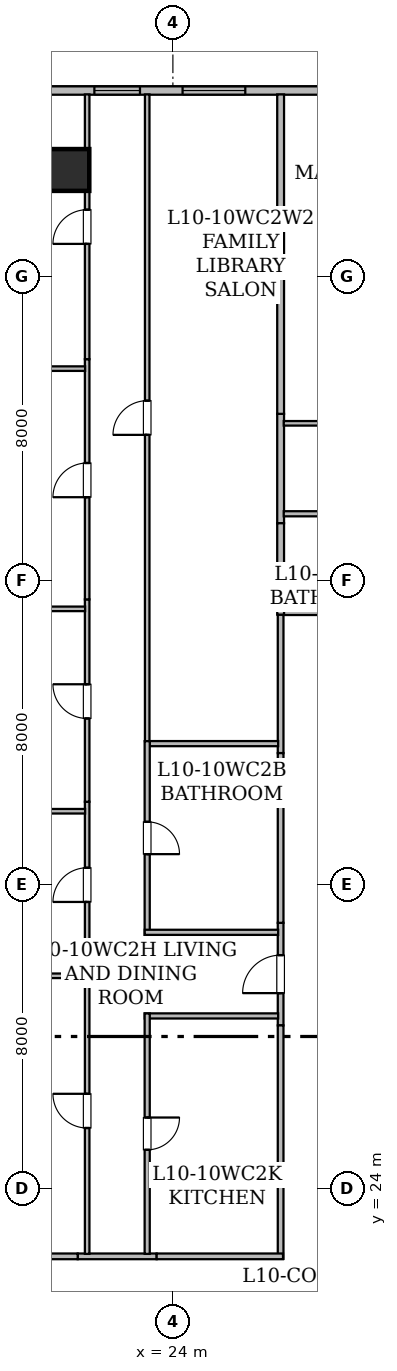
"""IFC4 building model, lengths in metres.
Left out: names, types, materials, properties, quantities, classifications, styles, units other than length and angle.
Written with IfcOpenShell. Run it as: python <this file> out.ifc"""

import sys

from ifc_helpers import new_model, si_unit, direction, frame, frame_2d, origin, origin_2d, place, context, subcontext, project, spatial, rectangle, hollow_rectangle, extrude, element, fill, save


model = new_model("IFC4")
c1 = context("Model", 3, precision=1e-05, world=origin(), true_north=direction((0.0, 1.0)))
c2 = subcontext(c1, "Body", "Model", "MODEL_VIEW")
j1 = project(units=[si_unit("LENGTHUNIT", "METRE"), si_unit("PLANEANGLEUNIT", "RADIAN")], contexts=[c1])
p1 = place(None, origin())
s1 = spatial("IfcSite", under=j1, at=p1, CompositionType="ELEMENT")
p2 = place(p1, origin())
s2 = spatial("IfcBuilding", under=s1, at=p2, CompositionType="ELEMENT")
p3 = place(p2, frame((0.0, 0.0, 44.25)))
s3 = spatial("IfcBuildingStorey", under=s2, at=p3, CompositionType="ELEMENT", Elevation=44.25)
p4 = place(p3, frame((21.25, 50.8, 0.0), z_axis=(0.0, 0.0, 1.0), x_axis=(1.0, 0.0, 0.0)))
e1 = element("IfcColumn", 1, at=p4, inside=s3, PredefinedType="COLUMN", context=c2, shape_type="SweptSolid", body=[
    extrude(hollow_rectangle(XDim=1.1, YDim=1.1, WallThickness=0.055, at=origin_2d()), origin(), (0.0, 0.0, 1.0), 3.65),
])
p5 = place(p3, frame((8.315, 52.89, 0.0), z_axis=(0.0, 0.0, 1.0), x_axis=(1.0, 0.0, 0.0)))
e2 = element("IfcWall", 2, at=p5, inside=s3, PredefinedType="STANDARD", context=c2, shape_type="SweptSolid", body=[
    extrude(rectangle(XDim=37.439, YDim=0.22, at=frame_2d((18.719, 0.0))), origin(), (0.0, 0.0, 1.0), 3.43),
])
p6 = place(p5, frame((3.164, 0.0, 0.85)))
e3 = element("IfcOpeningElement", 3, at=p6, cuts=e2, PredefinedType="OPENING", context=c2, shape_type="SweptSolid", body=[
    extrude(rectangle(XDim=1.65, YDim=1.55, at=frame_2d((0.825, 0.775))), frame((0.0, 0.12, 0.0), z_axis=(0.0, -1.0, 0.0), x_axis=(1.0, 0.0, 0.0)), (0.0, 0.0, 1.0), 0.24),
])
p7 = place(p5, frame((15.94, 0.0, 0.85)))
e4 = element("IfcOpeningElement", 4, at=p7, cuts=e2, PredefinedType="OPENING", context=c2, shape_type="SweptSolid", body=[
    extrude(rectangle(XDim=1.65, YDim=1.55, at=frame_2d((0.825, 0.775))), frame((0.0, 0.12, 0.0), z_axis=(0.0, -1.0, 0.0), x_axis=(1.0, 0.0, 0.0)), (0.0, 0.0, 1.0), 0.24),
])
p8 = place(p5, frame((13.619, 0.0, 0.8)))
e5 = element("IfcOpeningElement", 5, at=p8, cuts=e2, PredefinedType="OPENING", context=c2, shape_type="SweptSolid", body=[
    extrude(rectangle(XDim=1.2, YDim=1.5, at=frame_2d((0.6, 0.75))), frame((0.0, 0.12, 0.0), z_axis=(0.0, -1.0, 0.0), x_axis=(1.0, 0.0, 0.0)), (0.0, 0.0, 1.0), 0.24),
])
p9 = place(p5, frame((8.999, 0.0, 0.85)))
e6 = element("IfcOpeningElement", 6, at=p9, cuts=e2, PredefinedType="OPENING", context=c2, shape_type="SweptSolid", body=[
    extrude(rectangle(XDim=1.65, YDim=1.55, at=frame_2d((0.825, 0.775))), frame((0.0, 0.12, 0.0), z_axis=(0.0, -1.0, 0.0), x_axis=(1.0, 0.0, 0.0)), (0.0, 0.0, 1.0), 0.24),
])
p10 = place(p5, frame((25.185, 0.0, 0.8)))
e7 = element("IfcOpeningElement", 7, at=p10, cuts=e2, PredefinedType="OPENING", context=c2, shape_type="SweptSolid", body=[
    extrude(rectangle(XDim=1.2, YDim=1.5, at=frame_2d((0.6, 0.75))), frame((0.0, 0.12, 0.0), z_axis=(0.0, -1.0, 0.0), x_axis=(1.0, 0.0, 0.0)), (0.0, 0.0, 1.0), 0.24),
])
p11 = place(p5, frame((20.935, 0.0, 0.85)))
e8 = element("IfcOpeningElement", 8, at=p11, cuts=e2, PredefinedType="OPENING", context=c2, shape_type="SweptSolid", body=[
    extrude(rectangle(XDim=1.65, YDim=1.55, at=frame_2d((0.825, 0.775))), frame((0.0, 0.12, 0.0), z_axis=(0.0, -1.0, 0.0), x_axis=(1.0, 0.0, 0.0)), (0.0, 0.0, 1.0), 0.24),
])
p12 = place(p5, frame((28.985, 0.0, 0.85)))
e9 = element("IfcOpeningElement", 9, at=p12, cuts=e2, PredefinedType="OPENING", context=c2, shape_type="SweptSolid", body=[
    extrude(rectangle(XDim=1.65, YDim=1.55, at=frame_2d((0.825, 0.775))), frame((0.0, 0.12, 0.0), z_axis=(0.0, -1.0, 0.0), x_axis=(1.0, 0.0, 0.0)), (0.0, 0.0, 1.0), 0.24),
])
p13 = place(p5, frame((33.98, 0.0, 0.85)))
e10 = element("IfcOpeningElement", 10, at=p13, cuts=e2, PredefinedType="OPENING", context=c2, shape_type="SweptSolid", body=[
    extrude(rectangle(XDim=1.65, YDim=1.55, at=frame_2d((0.825, 0.775))), frame((0.0, 0.12, 0.0), z_axis=(0.0, -1.0, 0.0), x_axis=(1.0, 0.0, 0.0)), (0.0, 0.0, 1.0), 0.24),
])
p14 = place(p3, frame((26.835, 35.457, 0.0), z_axis=(0.0, 0.0, 1.0), x_axis=(0.0, 1.0, 0.0)))
e11 = element("IfcWall", 11, at=p14, inside=s3, PredefinedType="STANDARD", context=c2, shape_type="SweptSolid", body=[
    extrude(rectangle(XDim=3.643, YDim=0.15, at=frame_2d((1.822, 0.0))), origin(), (0.0, 0.0, 1.0), 2.647),
])
p15 = place(p3, frame((26.835, 28.292, 0.0), z_axis=(0.0, 0.0, 1.0), x_axis=(0.0, 1.0, 0.0)))
e12 = element("IfcWall", 12, at=p15, inside=s3, PredefinedType="STANDARD", context=c2, shape_type="SweptSolid", body=[
    extrude(rectangle(XDim=2.698, YDim=0.15, at=frame_2d((1.349, 0.0))), origin(), (0.0, 0.0, 1.0), 3.43),
])
p16 = place(p15, frame((0.849, 0.0, 0.0)))
e13 = element("IfcOpeningElement", 13, at=p16, cuts=e12, PredefinedType="OPENING", context=c2, shape_type="SweptSolid", body=[
    extrude(rectangle(XDim=1.0, YDim=2.15, at=frame_2d((0.5, 1.075))), frame((0.0, 0.085, 0.0), z_axis=(0.0, -1.0, 0.0), x_axis=(1.0, 0.0, 0.0)), (0.0, 0.0, 1.0), 0.17),
])
p17 = place(p3, frame((21.495, 22.215, 0.0), z_axis=(0.0, 0.0, 1.0), x_axis=(1.0, 0.0, 0.0)))
e14 = element("IfcWall", 14, at=p17, inside=s3, PredefinedType="STANDARD", context=c2, shape_type="SweptSolid", body=[
    extrude(rectangle(XDim=2.078, YDim=0.15, at=frame_2d((1.039, 0.0))), origin(), (0.0, 0.0, 1.0), 3.43),
])
p18 = place(p3, frame((26.835, 30.99, 0.0), z_axis=(0.0, 0.0, 1.0), x_axis=(0.0, 1.0, 0.0)))
e15 = element("IfcWall", 15, at=p18, inside=s3, PredefinedType="STANDARD", context=c2, shape_type="SweptSolid", body=[
    extrude(rectangle(XDim=4.467, YDim=0.15, at=frame_2d((2.233, 0.0))), origin(), (0.0, 0.0, 1.0), 3.43),
])
p19 = place(p3, frame((26.835, 22.15, 0.0), z_axis=(0.0, 0.0, 1.0), x_axis=(0.0, 1.0, 0.0)))
e16 = element("IfcWall", 16, at=p19, inside=s3, PredefinedType="STANDARD", context=c2, shape_type="SweptSolid", body=[
    extrude(rectangle(XDim=6.142, YDim=0.15, at=frame_2d((3.071, 0.0))), origin(), (0.0, 0.0, 1.0), 2.957),
])
p20 = place(p3, frame((23.573, 22.215, 0.0), z_axis=(0.0, 0.0, 1.0), x_axis=(1.0, 0.0, 0.0)))
e17 = element("IfcWall", 17, at=p20, inside=s3, PredefinedType="STANDARD", context=c2, shape_type="SweptSolid", body=[
    extrude(rectangle(XDim=3.325, YDim=0.15, at=frame_2d((1.663, 0.0))), origin(), (0.0, 0.0, 1.0), 3.43),
])
p21 = place(p3, frame((14.783, 22.215, 0.0), z_axis=(0.0, 0.0, 1.0), x_axis=(1.0, 0.0, 0.0)))
e18 = element("IfcWall", 18, at=p21, inside=s3, PredefinedType="STANDARD", context=c2, shape_type="SweptSolid", body=[
    extrude(rectangle(XDim=6.712, YDim=0.15, at=frame_2d((3.356, 0.0))), origin(), (0.0, 0.0, 1.0), 2.647),
])
p22 = place(p3, frame((26.9, 39.165, 0.0), z_axis=(0.0, 0.0, 1.0), x_axis=(1.0, 0.0, 0.0)))
e19 = element("IfcWall", 19, at=p22, inside=s3, PredefinedType="STANDARD", context=c2, shape_type="SweptSolid", body=[
    extrude(rectangle(XDim=4.701, YDim=0.15, at=frame_2d((2.351, 0.0))), origin(), (0.0, 0.0, 1.0), 2.647),
])
p23 = place(p3, frame((23.324, 35.771, 0.0), z_axis=(0.0, 0.0, 1.0), x_axis=(0.0, 1.0, 0.0)))
e20 = element("IfcWall", 20, at=p23, inside=s3, PredefinedType="PARTITIONING", context=c2, shape_type="SweptSolid", body=[
    extrude(rectangle(XDim=17.017, YDim=0.12, at=frame_2d((8.509, 0.0))), origin(), (0.0, 0.0, 1.0), 2.647),
])
p24 = place(p23, frame((8.059, 0.0, 0.0)))
e21 = element("IfcOpeningElement", 21, at=p24, cuts=e20, PredefinedType="OPENING", context=c2, shape_type="SweptSolid", body=[
    extrude(rectangle(XDim=0.9, YDim=2.1, at=frame_2d((0.45, 1.05))), frame((0.0, 0.07, 0.0), z_axis=(0.0, -1.0, 0.0), x_axis=(1.0, 0.0, 0.0)), (0.0, 0.0, 1.0), 0.14),
])
p25 = place(p3, frame((26.77, 35.706, 0.0), z_axis=(0.0, 0.0, 1.0), x_axis=(-1.0, 0.0, 0.0)))
e22 = element("IfcWall", 22, at=p25, inside=s3, PredefinedType="PARTITIONING", context=c2, shape_type="SweptSolid", body=[
    extrude(rectangle(XDim=3.381, YDim=0.135, at=frame_2d((1.69, 0.0))), origin(), (0.0, 0.0, 1.0), 3.43),
])
p26 = place(p3, frame((26.835, 44.383, 0.0), z_axis=(0.0, 0.0, 1.0), x_axis=(0.0, -1.0, 0.0)))
e23 = element("IfcWall", 23, at=p26, inside=s3, PredefinedType="STANDARD", context=c2, shape_type="SweptSolid", body=[
    extrude(rectangle(XDim=2.878, YDim=0.18, at=frame_2d((1.439, 0.0))), origin(), (0.0, 0.0, 1.0), 2.957),
])
p27 = place(p3, frame((26.835, 41.505, 0.0), z_axis=(0.0, 0.0, 1.0), x_axis=(0.0, -1.0, 0.0)))
e24 = element("IfcWall", 24, at=p27, inside=s3, PredefinedType="STANDARD", context=c2, shape_type="SweptSolid", body=[
    extrude(rectangle(XDim=2.405, YDim=0.18, at=frame_2d((1.202, 0.0))), origin(), (0.0, 0.0, 1.0), 3.43),
])
p28 = place(p3, frame((26.835, 52.788, 0.0), z_axis=(0.0, 0.0, 1.0), x_axis=(0.0, -1.0, 0.0)))
e25 = element("IfcWall", 25, at=p28, inside=s3, PredefinedType="STANDARD", context=c2, shape_type="SweptSolid", body=[
    extrude(rectangle(XDim=8.405, YDim=0.18, at=frame_2d((4.203, 0.0))), origin(), (0.0, 0.0, 1.0), 2.803),
])
p29 = place(p3, frame((23.324, 35.771, 0.0), z_axis=(0.0, 0.0, 1.0), x_axis=(0.0, -1.0, 0.0)))
e26 = element("IfcWall", 26, at=p29, inside=s3, PredefinedType="PARTITIONING", context=c2, shape_type="SweptSolid", body=[
    extrude(rectangle(XDim=5.095, YDim=0.135, at=frame_2d((2.547, 0.0))), origin(), (0.0, 0.0, 1.0), 3.43),
])
p30 = place(p29, frame((2.123, 0.0, 0.0)))
e27 = element("IfcOpeningElement", 27, at=p30, cuts=e26, PredefinedType="OPENING", context=c2, shape_type="SweptSolid", body=[
    extrude(rectangle(XDim=0.85, YDim=2.1, at=frame_2d((0.425, 1.05))), frame((0.0, 0.077, 0.0), z_axis=(0.0, -1.0, 0.0), x_axis=(1.0, 0.0, 0.0)), (0.0, 0.0, 1.0), 0.155),
])
for number, where, z_axis, x_axis in (
    (28, (23.259, 30.741, 0.0), (0.0, 0.0, 1.0), (1.0, 0.0, 0.0)),
    (29, (26.77, 28.541, 0.0), (0.0, 0.0, 1.0), (-1.0, 0.0, 0.0)),
):
    element("IfcWall", number, at=place(p3, frame(where, z_axis=z_axis, x_axis=x_axis)), inside=s3, PredefinedType="PARTITIONING", context=c2, shape_type="SweptSolid", body=[
        extrude(rectangle(XDim=3.511, YDim=0.135, at=frame_2d((1.755, 0.0))), origin(), (0.0, 0.0, 1.0), 3.43),
    ])
p31 = place(p3, frame((23.324, 28.606, 0.0), z_axis=(0.0, 0.0, 1.0), x_axis=(0.0, -1.0, 0.0)))
e30 = element("IfcWall", 30, at=p31, inside=s3, PredefinedType="PARTITIONING", context=c2, shape_type="SweptSolid", body=[
    extrude(rectangle(XDim=6.326, YDim=0.135, at=frame_2d((3.163, 0.0))), origin(), (0.0, 0.0, 1.0), 2.957),
])
p32 = place(p31, frame((2.738, 0.0, 0.0)))
e31 = element("IfcOpeningElement", 31, at=p32, cuts=e30, PredefinedType="OPENING", context=c2, shape_type="SweptSolid", body=[
    extrude(rectangle(XDim=0.85, YDim=2.1, at=frame_2d((0.425, 1.05))), frame((0.0, 0.077, 0.0), z_axis=(0.0, -1.0, 0.0), x_axis=(1.0, 0.0, 0.0)), (0.0, 0.0, 1.0), 0.155),
])
p33 = place(p3, frame((21.744, 22.28, 0.0), z_axis=(0.0, 0.0, 1.0), x_axis=(0.0, 1.0, 0.0)))
e32 = element("IfcWall", 32, at=p33, inside=s3, PredefinedType="PARTITIONING", context=c2, shape_type="SweptSolid", body=[
    extrude(rectangle(XDim=7.566, YDim=0.12, at=frame_2d((3.783, 0.0))), origin(), (0.0, 0.0, 1.0), 2.957),
])
p34 = place(p33, frame((3.312, 0.0, 0.0)))
e33 = element("IfcOpeningElement", 33, at=p34, cuts=e32, PredefinedType="OPENING", context=c2, shape_type="SweptSolid", body=[
    extrude(rectangle(XDim=0.9, YDim=2.1, at=frame_2d((0.45, 1.05))), frame((0.0, 0.07, 0.0), z_axis=(0.0, -1.0, 0.0), x_axis=(1.0, 0.0, 0.0)), (0.0, 0.0, 1.0), 0.14),
])
p35 = place(p3, frame((21.744, 29.846, 0.0), z_axis=(0.0, 0.0, 1.0), x_axis=(0.0, 1.0, 0.0)))
e34 = element("IfcWall", 34, at=p35, inside=s3, PredefinedType="PARTITIONING", context=c2, shape_type="SweptSolid", body=[
    extrude(rectangle(XDim=4.33, YDim=0.12, at=frame_2d((2.165, 0.0))), origin(), (0.0, 0.0, 1.0), 3.43),
])
p36 = place(p35, frame((1.694, 0.0, 0.0)))
e35 = element("IfcOpeningElement", 35, at=p36, cuts=e34, PredefinedType="OPENING", context=c2, shape_type="SweptSolid", body=[
    extrude(rectangle(XDim=0.9, YDim=2.1, at=frame_2d((0.45, 1.05))), frame((0.0, 0.07, 0.0), z_axis=(0.0, -1.0, 0.0), x_axis=(1.0, 0.0, 0.0)), (0.0, 0.0, 1.0), 0.14),
])
p37 = place(p3, frame((21.744, 34.176, 0.0), z_axis=(0.0, 0.0, 1.0), x_axis=(0.0, 1.0, 0.0)))
e36 = element("IfcWall", 36, at=p37, inside=s3, PredefinedType="PARTITIONING", context=c2, shape_type="SweptSolid", body=[
    extrude(rectangle(XDim=5.325, YDim=0.12, at=frame_2d((2.663, 0.0))), origin(), (0.0, 0.0, 1.0), 2.647),
])
p38 = place(p37, frame((2.192, 0.0, 0.0)))
e37 = element("IfcOpeningElement", 37, at=p38, cuts=e36, PredefinedType="OPENING", context=c2, shape_type="SweptSolid", body=[
    extrude(rectangle(XDim=0.9, YDim=2.1, at=frame_2d((0.45, 1.05))), frame((0.0, 0.07, 0.0), z_axis=(0.0, -1.0, 0.0), x_axis=(1.0, 0.0, 0.0)), (0.0, 0.0, 1.0), 0.14),
])
p39 = place(p3, frame((21.744, 39.501, 0.0), z_axis=(0.0, 0.0, 1.0), x_axis=(0.0, 1.0, 0.0)))
e38 = element("IfcWall", 38, at=p39, inside=s3, PredefinedType="PARTITIONING", context=c2, shape_type="SweptSolid", body=[
    extrude(rectangle(XDim=6.321, YDim=0.12, at=frame_2d((3.161, 0.0))), origin(), (0.0, 0.0, 1.0), 2.957),
])
p40 = place(p39, frame((2.689, 0.0, 0.0)))
e39 = element("IfcOpeningElement", 39, at=p40, cuts=e38, PredefinedType="OPENING", context=c2, shape_type="SweptSolid", body=[
    extrude(rectangle(XDim=0.9, YDim=2.1, at=frame_2d((0.45, 1.05))), frame((0.0, 0.07, 0.0), z_axis=(0.0, -1.0, 0.0), x_axis=(1.0, 0.0, 0.0)), (0.0, 0.0, 1.0), 0.14),
])
p41 = place(p3, frame((21.744, 45.822, 0.0), z_axis=(0.0, 0.0, 1.0), x_axis=(0.0, 1.0, 0.0)))
e40 = element("IfcWall", 40, at=p41, inside=s3, PredefinedType="PARTITIONING", context=c2, shape_type="SweptSolid", body=[
    extrude(rectangle(XDim=6.966, YDim=0.12, at=frame_2d((3.483, 0.0))), origin(), (0.0, 0.0, 1.0), 2.803),
])
p42 = place(p41, frame((3.033, 0.0, 0.0)))
e41 = element("IfcOpeningElement", 41, at=p42, cuts=e40, PredefinedType="OPENING", context=c2, shape_type="SweptSolid", body=[
    extrude(rectangle(XDim=0.9, YDim=2.1, at=frame_2d((0.45, 1.05))), frame((0.0, 0.07, 0.0), z_axis=(0.0, -1.0, 0.0), x_axis=(1.0, 0.0, 0.0)), (0.0, 0.0, 1.0), 0.14),
])
for number, where, z_axis, x_axis in (
    (42, (14.616, 29.597, 0.0), (0.0, 0.0, 1.0), (1.0, 0.0, 0.0)),
    (43, (14.616, 33.927, 0.0), (0.0, 0.0, 1.0), (1.0, 0.0, 0.0)),
    (44, (14.616, 39.252, 0.0), (0.0, 0.0, 1.0), (1.0, 0.0, 0.0)),
    (45, (14.616, 45.573, 0.0), (0.0, 0.0, 1.0), (1.0, 0.0, 0.0)),
):
    element("IfcWall", number, at=place(p3, frame(where, z_axis=z_axis, x_axis=x_axis)), inside=s3, PredefinedType="PARTITIONING", context=c2, shape_type="SweptSolid", body=[
        extrude(rectangle(XDim=7.074, YDim=0.12, at=frame_2d((3.537, 0.0))), origin(), (0.0, 0.0, 1.0), 2.647),
    ])
p43 = place(p3, frame((31.915, 41.754, 0.0), z_axis=(0.0, 0.0, 1.0), x_axis=(-1.0, 0.0, 0.0)))
e46 = element("IfcWall", 46, at=p43, inside=s3, PredefinedType="PARTITIONING", context=c2, shape_type="SweptSolid", body=[
    extrude(rectangle(XDim=4.998, YDim=0.135, at=frame_2d((2.499, 0.0))), origin(), (0.0, 0.0, 1.0), 2.647),
])
p44 = place(p43, frame((2.074, 0.0, 0.0)))
e47 = element("IfcOpeningElement", 47, at=p44, cuts=e46, PredefinedType="OPENING", context=c2, shape_type="SweptSolid", body=[
    extrude(rectangle(XDim=0.85, YDim=2.1, at=frame_2d((0.425, 1.05))), frame((0.0, 0.077, 0.0), z_axis=(0.0, -1.0, 0.0), x_axis=(1.0, 0.0, 0.0)), (0.0, 0.0, 1.0), 0.155),
])
p45 = place(p3, frame((26.917, 44.134, 0.0), z_axis=(0.0, 0.0, 1.0), x_axis=(1.0, 0.0, 0.0)))
e48 = element("IfcWall", 48, at=p45, inside=s3, PredefinedType="PARTITIONING", context=c2, shape_type="SweptSolid", body=[
    extrude(rectangle(XDim=6.463, YDim=0.12, at=frame_2d((3.231, 0.0))), origin(), (0.0, 0.0, 1.0), 2.647),
])
p46 = place(p7, origin())
e49 = element("IfcWindow", 49, at=p46, inside=s3, PartitioningType="SINGLE_PANEL", PredefinedType="WINDOW", context=c2, shape_type="SweptSolid", body=[
    extrude(rectangle(XDim=1.65, YDim=1.55, at=frame_2d((0.825, 0.775))), frame((0.0, 0.03, 0.0), z_axis=(0.0, -1.0, 0.0), x_axis=(1.0, 0.0, 0.0)), (0.0, 0.0, 1.0), 0.06),
])
fill(e4, e49)
p47 = place(p8, origin())
e50 = element("IfcWindow", 50, at=p47, inside=s3, PartitioningType="SINGLE_PANEL", PredefinedType="WINDOW", context=c2, shape_type="SweptSolid", body=[
    extrude(rectangle(XDim=1.2, YDim=1.5, at=frame_2d((0.6, 0.75))), frame((0.0, 0.03, 0.0), z_axis=(0.0, -1.0, 0.0), x_axis=(1.0, 0.0, 0.0)), (0.0, 0.0, 1.0), 0.06),
])
fill(e5, e50)
p48 = place(p16, origin())
e51 = element("IfcDoor", 51, at=p48, inside=s3, OperationType="SINGLE_SWING_LEFT", PredefinedType="DOOR", context=c2, shape_type="SweptSolid", body=[
    extrude(rectangle(XDim=1.0, YDim=2.15, at=frame_2d((0.5, 1.075))), frame((0.0, 0.025, 0.0), z_axis=(0.0, -1.0, 0.0), x_axis=(1.0, 0.0, 0.0)), (0.0, 0.0, 1.0), 0.05),
])
fill(e13, e51)
p49 = place(p24, origin())
e52 = element("IfcDoor", 52, at=p49, inside=s3, OperationType="SINGLE_SWING_LEFT", PredefinedType="DOOR", context=c2, shape_type="SweptSolid", body=[
    extrude(rectangle(XDim=0.9, YDim=2.1, at=frame_2d((0.45, 1.05))), frame((0.0, 0.025, 0.0), z_axis=(0.0, -1.0, 0.0), x_axis=(1.0, 0.0, 0.0)), (0.0, 0.0, 1.0), 0.05),
])
fill(e21, e52)
p50 = place(p30, origin())
e53 = element("IfcDoor", 53, at=p50, inside=s3, OperationType="SINGLE_SWING_RIGHT", PredefinedType="DOOR", context=c2, shape_type="SweptSolid", body=[
    extrude(rectangle(XDim=0.85, YDim=2.1, at=frame_2d((0.425, 1.05))), frame((0.0, 0.025, 0.0), z_axis=(0.0, -1.0, 0.0), x_axis=(1.0, 0.0, 0.0)), (0.0, 0.0, 1.0), 0.05),
])
fill(e27, e53)
p51 = place(p32, origin())
e54 = element("IfcDoor", 54, at=p51, inside=s3, OperationType="SINGLE_SWING_LEFT", PredefinedType="DOOR", context=c2, shape_type="SweptSolid", body=[
    extrude(rectangle(XDim=0.85, YDim=2.1, at=frame_2d((0.425, 1.05))), frame((0.0, 0.025, 0.0), z_axis=(0.0, -1.0, 0.0), x_axis=(1.0, 0.0, 0.0)), (0.0, 0.0, 1.0), 0.05),
])
fill(e31, e54)
p52 = place(p34, origin())
e55 = element("IfcDoor", 55, at=p52, inside=s3, OperationType="SINGLE_SWING_RIGHT", PredefinedType="DOOR", context=c2, shape_type="SweptSolid", body=[
    extrude(rectangle(XDim=0.9, YDim=2.1, at=frame_2d((0.45, 1.05))), frame((0.0, 0.025, 0.0), z_axis=(0.0, -1.0, 0.0), x_axis=(1.0, 0.0, 0.0)), (0.0, 0.0, 1.0), 0.05),
])
fill(e33, e55)
p53 = place(p36, origin())
e56 = element("IfcDoor", 56, at=p53, inside=s3, OperationType="SINGLE_SWING_LEFT", PredefinedType="DOOR", context=c2, shape_type="SweptSolid", body=[
    extrude(rectangle(XDim=0.9, YDim=2.1, at=frame_2d((0.45, 1.05))), frame((0.0, 0.025, 0.0), z_axis=(0.0, -1.0, 0.0), x_axis=(1.0, 0.0, 0.0)), (0.0, 0.0, 1.0), 0.05),
])
fill(e35, e56)
p54 = place(p38, origin())
e57 = element("IfcDoor", 57, at=p54, inside=s3, OperationType="SINGLE_SWING_RIGHT", PredefinedType="DOOR", context=c2, shape_type="SweptSolid", body=[
    extrude(rectangle(XDim=0.9, YDim=2.1, at=frame_2d((0.45, 1.05))), frame((0.0, 0.025, 0.0), z_axis=(0.0, -1.0, 0.0), x_axis=(1.0, 0.0, 0.0)), (0.0, 0.0, 1.0), 0.05),
])
fill(e37, e57)
p55 = place(p40, origin())
e58 = element("IfcDoor", 58, at=p55, inside=s3, OperationType="SINGLE_SWING_LEFT", PredefinedType="DOOR", context=c2, shape_type="SweptSolid", body=[
    extrude(rectangle(XDim=0.9, YDim=2.1, at=frame_2d((0.45, 1.05))), frame((0.0, 0.025, 0.0), z_axis=(0.0, -1.0, 0.0), x_axis=(1.0, 0.0, 0.0)), (0.0, 0.0, 1.0), 0.05),
])
fill(e39, e58)
p56 = place(p42, origin())
e59 = element("IfcDoor", 59, at=p56, inside=s3, OperationType="SINGLE_SWING_LEFT", PredefinedType="DOOR", context=c2, shape_type="SweptSolid", body=[
    extrude(rectangle(XDim=0.9, YDim=2.1, at=frame_2d((0.45, 1.05))), frame((0.0, 0.025, 0.0), z_axis=(0.0, -1.0, 0.0), x_axis=(1.0, 0.0, 0.0)), (0.0, 0.0, 1.0), 0.05),
])
fill(e41, e59)
save(model, sys.argv[1])
